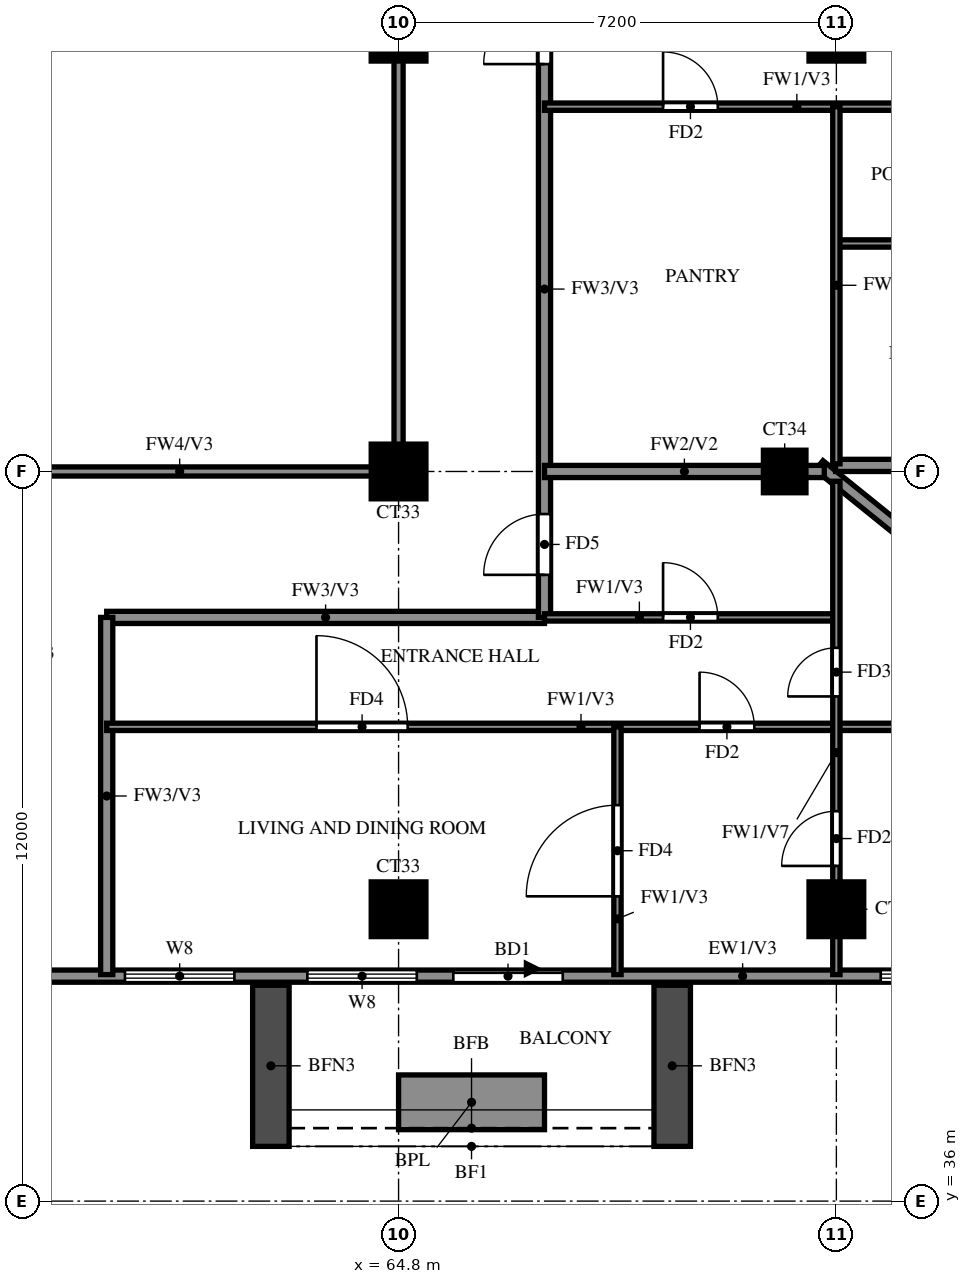
"""IFC4 building model, lengths in metres.
Left out: names, types, materials, properties, quantities, classifications, styles, units other than length and angle.
Written with IfcOpenShell. Run it as: python <this file> out.ifc"""

import sys

from ifc_helpers import new_model, si_unit, direction, frame, frame_2d, origin, origin_2d, place, context, subcontext, project, spatial, rectangle, extrude, source, transform, mapped, element, fill, save


model = new_model("IFC4")
c1 = context("Model", 3, precision=1e-05, world=origin(), true_north=direction((0.0, 1.0)))
c2 = subcontext(c1, "Body", "Model", "MODEL_VIEW")
j1 = project(units=[si_unit("LENGTHUNIT", "METRE"), si_unit("PLANEANGLEUNIT", "RADIAN")], contexts=[c1])
p1 = place(None, origin())
s1 = spatial("IfcSite", under=j1, at=p1, CompositionType="ELEMENT")
p2 = place(p1, origin())
s2 = spatial("IfcBuilding", under=s1, at=p2, CompositionType="ELEMENT")
p3 = place(p2, frame((0.0, 0.0, 229.0)))
s3 = spatial("IfcBuildingStorey", under=s2, at=p3, CompositionType="ELEMENT", Elevation=229.0)
m1 = source(origin(), c2, "Body", "SweptSolid", [
    extrude(rectangle(XDim=0.9, YDim=0.9, at=origin_2d()), origin(), (0.0, 0.0, 1.0), 3.22),
])
for number, where, z_axis, x_axis in (
    (1, (64.8, 40.8, 0.0), (0.0, 0.0, 1.0), (1.0, 0.0, 0.0)),
    (2, (72.0, 40.8, 0.0), (0.0, 0.0, 1.0), (1.0, 0.0, 0.0)),
    (3, (64.8, 48.0, 0.0), (0.0, 0.0, 1.0), (1.0, 0.0, 0.0)),
):
    element("IfcColumn", number, at=place(p3, frame(where, z_axis=z_axis, x_axis=x_axis)), inside=s3, PredefinedType="COLUMN", context=c2, shape_type="MappedRepresentation", body=[
        mapped(m1, transform((0.0, 0.0, 0.0))),
    ])
m2 = source(origin(), c2, "Body", "SweptSolid", [
    extrude(rectangle(XDim=0.7, YDim=0.7, at=origin_2d()), origin(), (0.0, 0.0, 1.0), 3.22),
])
p4 = place(p3, frame((71.15, 48.0, 0.0), z_axis=(0.0, 0.0, 1.0), x_axis=(1.0, 0.0, 0.0)))
e4 = element("IfcColumn", 4, at=p4, inside=s3, PredefinedType="COLUMN", context=c2, shape_type="MappedRepresentation", body=[
    mapped(m2, transform((0.0, 0.0, 0.0))),
])
for number, where, z_axis, x_axis in (
    (5, (64.8, 55.2, 0.0), (0.0, 0.0, 1.0), (1.0, 0.0, 0.0)),
    (6, (72.0, 55.2, 0.0), (0.0, 0.0, 1.0), (1.0, 0.0, 0.0)),
):
    element("IfcColumn", number, at=place(p3, frame(where, z_axis=z_axis, x_axis=x_axis)), inside=s3, PredefinedType="COLUMN", context=c2, shape_type="MappedRepresentation", body=[
        mapped(m1, transform((0.0, 0.0, 0.0))),
    ])
p5 = place(p3, frame((81.907, 39.87, 0.0), z_axis=(0.0, 0.0, 1.0), x_axis=(-0.777936274417, 0.62834318087, 0.0)))
e7 = element("IfcWall", 7, at=p5, inside=s3, PredefinedType="SOLIDWALL", context=c2, shape_type="SweptSolid", body=[
    extrude(rectangle(XDim=13.099, YDim=0.2, at=frame_2d((6.549, 0.0))), origin(), (0.0, 0.0, 1.0), 3.22),
])
p6 = place(p5, frame((9.938, 0.0, 1.5)))
e8 = element("IfcOpeningElement", 8, at=p6, cuts=e7, PredefinedType="OPENING", context=c2, shape_type="SweptSolid", body=[
    extrude(rectangle(XDim=0.9, YDim=0.9, at=frame_2d((0.45, 0.45))), frame((0.0, 0.11, 0.0), z_axis=(0.0, -1.0, 0.0), x_axis=(1.0, 0.0, 0.0)), (0.0, 0.0, 1.0), 0.22),
])
p7 = place(p3, frame((71.987, 48.1, 0.0), z_axis=(0.0, 0.0, 1.0), x_axis=(1.0, 0.0, 0.0)))
e9 = element("IfcWall", 9, at=p7, inside=s3, PredefinedType="SOLIDWALL", context=c2, shape_type="SweptSolid", body=[
    extrude(rectangle(XDim=6.763, YDim=0.2, at=frame_2d((3.381, 0.0))), origin(), (0.0, 0.0, 1.0), 3.22),
])
p8 = place(p7, frame((1.406, 0.0, 1.5)))
e10 = element("IfcOpeningElement", 10, at=p8, cuts=e9, PredefinedType="OPENING", context=c2, shape_type="SweptSolid", body=[
    extrude(rectangle(XDim=0.9, YDim=0.9, at=frame_2d((0.45, 0.45))), frame((0.0, 0.11, 0.0), z_axis=(0.0, -1.0, 0.0), x_axis=(1.0, 0.0, 0.0)), (0.0, 0.0, 1.0), 0.22),
])
p9 = place(p3, frame((58.8, 39.7, 0.0), z_axis=(0.0, 0.0, 1.0), x_axis=(1.0, 0.0, 0.0)))
e11 = element("IfcWall", 11, at=p9, inside=s3, PredefinedType="SOLIDWALL", context=c2, shape_type="SweptSolid", body=[
    extrude(rectangle(XDim=23.317, YDim=0.2, at=frame_2d((11.658, 0.0))), origin(), (0.0, 0.0, 1.0), 3.22),
])
p10 = place(p9, frame((6.9, 0.0, 0.0)))
e12 = element("IfcOpeningElement", 12, at=p10, cuts=e11, PredefinedType="OPENING", context=c2, shape_type="SweptSolid", body=[
    extrude(rectangle(XDim=1.8, YDim=2.4, at=frame_2d((0.9, 1.2))), frame((0.0, 0.11, 0.0), z_axis=(0.0, -1.0, 0.0), x_axis=(1.0, 0.0, 0.0)), (0.0, 0.0, 1.0), 0.22),
])
p11 = place(p9, frame((1.5, 0.0, 0.6)))
e13 = element("IfcOpeningElement", 13, at=p11, cuts=e11, PredefinedType="OPENING", context=c2, shape_type="SweptSolid", body=[
    extrude(rectangle(XDim=1.8, YDim=2.4, at=frame_2d((0.9, 1.2))), frame((0.0, 0.11, 0.0), z_axis=(0.0, -1.0, 0.0), x_axis=(1.0, 0.0, 0.0)), (0.0, 0.0, 1.0), 0.22),
])
p12 = place(p9, frame((4.5, 0.0, 0.6)))
e14 = element("IfcOpeningElement", 14, at=p12, cuts=e11, PredefinedType="OPENING", context=c2, shape_type="SweptSolid", body=[
    extrude(rectangle(XDim=1.8, YDim=2.4, at=frame_2d((0.9, 1.2))), frame((0.0, 0.11, 0.0), z_axis=(0.0, -1.0, 0.0), x_axis=(1.0, 0.0, 0.0)), (0.0, 0.0, 1.0), 0.22),
])
p13 = place(p9, frame((13.929, 0.0, 0.6)))
e15 = element("IfcOpeningElement", 15, at=p13, cuts=e11, PredefinedType="OPENING", context=c2, shape_type="SweptSolid", body=[
    extrude(rectangle(XDim=2.4, YDim=2.4, at=frame_2d((1.2, 1.2))), frame((0.0, 0.11, 0.0), z_axis=(0.0, -1.0, 0.0), x_axis=(1.0, 0.0, 0.0)), (0.0, 0.0, 1.0), 0.22),
])
p14 = place(p9, frame((16.958, 0.0, 0.6)))
e16 = element("IfcOpeningElement", 16, at=p14, cuts=e11, PredefinedType="OPENING", context=c2, shape_type="SweptSolid", body=[
    extrude(rectangle(XDim=2.4, YDim=2.4, at=frame_2d((1.2, 1.2))), frame((0.0, 0.11, 0.0), z_axis=(0.0, -1.0, 0.0), x_axis=(1.0, 0.0, 0.0)), (0.0, 0.0, 1.0), 0.22),
])
p15 = place(p9, frame((19.988, 0.0, 0.6)))
e17 = element("IfcOpeningElement", 17, at=p15, cuts=e11, PredefinedType="OPENING", context=c2, shape_type="SweptSolid", body=[
    extrude(rectangle(XDim=2.4, YDim=2.4, at=frame_2d((1.2, 1.2))), frame((0.0, 0.11, 0.0), z_axis=(0.0, -1.0, 0.0), x_axis=(1.0, 0.0, 0.0)), (0.0, 0.0, 1.0), 0.22),
])
for number, where, z_axis, x_axis in (
    (18, (62.7, 39.55, 0.0), (0.0, 0.0, 1.0), (0.0, -1.0, 0.0)),
    (19, (69.3, 39.55, 0.0), (0.0, 0.0, 1.0), (0.0, -1.0, 0.0)),
):
    element("IfcWall", number, at=place(p3, frame(where, z_axis=z_axis, x_axis=x_axis)), inside=s3, PredefinedType="SOLIDWALL", context=c2, shape_type="SweptSolid", body=[
        extrude(rectangle(XDim=2.65, YDim=0.6, at=frame_2d((1.325, 0.0))), origin(), (0.0, 0.0, 1.0), 2.85),
    ])
p16 = place(p3, frame((64.8, 37.625, 0.0), z_axis=(0.0, 0.0, 1.0), x_axis=(1.0, 0.0, 0.0)))
e20 = element("IfcWall", 20, at=p16, inside=s3, PredefinedType="SOLIDWALL", context=c2, shape_type="SweptSolid", body=[
    extrude(rectangle(XDim=2.4, YDim=0.9, at=frame_2d((1.2, 0.0))), origin(), (0.0, 0.0, 1.0), 0.9),
])
p17 = place(p3, frame((60.0, 45.6, 0.0), z_axis=(0.0, 0.0, 1.0), x_axis=(1.0, 0.0, 0.0)))
e21 = element("IfcWall", 21, at=p17, inside=s3, PredefinedType="SOLIDWALL", context=c2, shape_type="SweptSolid", body=[
    extrude(rectangle(XDim=7.2, YDim=0.2, at=frame_2d((3.6, 0.0))), origin(), (0.0, 0.0, 1.0), 3.22),
])
p18 = place(p3, frame((60.0, 39.725, 0.0), z_axis=(0.0, 0.0, 1.0), x_axis=(0.0, 1.0, 0.0)))
e22 = element("IfcWall", 22, at=p18, inside=s3, PredefinedType="SOLIDWALL", context=c2, shape_type="SweptSolid", body=[
    extrude(rectangle(XDim=5.875, YDim=0.2, at=frame_2d((2.938, 0.0))), origin(), (0.0, 0.0, 1.0), 3.22),
])
p19 = place(p3, frame((67.2, 45.6, 0.0), z_axis=(0.0, 0.0, 1.0), x_axis=(0.0, 1.0, 0.0)))
e23 = element("IfcWall", 23, at=p19, inside=s3, PredefinedType="SOLIDWALL", context=c2, shape_type="SweptSolid", body=[
    extrude(rectangle(XDim=10.8, YDim=0.2, at=frame_2d((5.4, 0.0))), origin(), (0.0, 0.0, 1.0), 3.22),
])
p20 = place(p19, frame((9.1, 0.0, 0.0)))
e24 = element("IfcOpeningElement", 24, at=p20, cuts=e23, PredefinedType="OPENING", context=c2, shape_type="SweptSolid", body=[
    extrude(rectangle(XDim=1.0, YDim=2.1, at=frame_2d((0.5, 1.05))), frame((0.0, 0.11, 0.0), z_axis=(0.0, -1.0, 0.0), x_axis=(1.0, 0.0, 0.0)), (0.0, 0.0, 1.0), 0.22),
])
p21 = place(p19, frame((0.7, 0.0, 0.0)))
e25 = element("IfcOpeningElement", 25, at=p21, cuts=e23, PredefinedType="OPENING", context=c2, shape_type="SweptSolid", body=[
    extrude(rectangle(XDim=1.0, YDim=2.1, at=frame_2d((0.5, 1.05))), frame((0.0, 0.11, 0.0), z_axis=(0.0, -1.0, 0.0), x_axis=(1.0, 0.0, 0.0)), (0.0, 0.0, 1.0), 0.22),
])
p22 = place(p3, frame((67.2, 48.0, 0.0), z_axis=(0.0, 0.0, 1.0), x_axis=(1.0, 0.0, 0.0)))
e26 = element("IfcWall", 26, at=p22, inside=s3, PredefinedType="SOLIDWALL", context=c2, shape_type="SweptSolid", body=[
    extrude(rectangle(XDim=4.601, YDim=0.2, at=frame_2d((2.301, 0.0))), origin(), (0.0, 0.0, 1.0), 3.22),
])
p23 = place(p3, frame((60.0, 43.8, 0.0), z_axis=(0.0, 0.0, 1.0), x_axis=(1.0, 0.0, 0.0)))
e27 = element("IfcWall", 27, at=p23, inside=s3, PredefinedType="PARTITIONING", context=c2, shape_type="SweptSolid", body=[
    extrude(rectangle(XDim=15.6, YDim=0.12, at=frame_2d((7.8, 0.0))), origin(), (0.0, 0.0, 1.0), 3.22),
])
p24 = place(p23, frame((9.75, 0.0, 0.0)))
e28 = element("IfcOpeningElement", 28, at=p24, cuts=e27, PredefinedType="OPENING", context=c2, shape_type="SweptSolid", body=[
    extrude(rectangle(XDim=0.9, YDim=2.1, at=frame_2d((0.45, 1.05))), frame((0.0, 0.07, 0.0), z_axis=(0.0, -1.0, 0.0), x_axis=(1.0, 0.0, 0.0)), (0.0, 0.0, 1.0), 0.14),
])
p25 = place(p23, frame((3.45, 0.0, 0.0)))
e29 = element("IfcOpeningElement", 29, at=p25, cuts=e27, PredefinedType="OPENING", context=c2, shape_type="SweptSolid", body=[
    extrude(rectangle(XDim=1.5, YDim=2.1, at=frame_2d((0.75, 1.05))), frame((0.0, 0.07, 0.0), z_axis=(0.0, -1.0, 0.0), x_axis=(1.0, 0.0, 0.0)), (0.0, 0.0, 1.0), 0.14),
])
p26 = place(p23, frame((13.4, 0.0, 0.0)))
e30 = element("IfcOpeningElement", 30, at=p26, cuts=e27, PredefinedType="OPENING", context=c2, shape_type="SweptSolid", body=[
    extrude(rectangle(XDim=0.8, YDim=2.1, at=frame_2d((0.4, 1.05))), frame((0.0, 0.07, 0.0), z_axis=(0.0, -1.0, 0.0), x_axis=(1.0, 0.0, 0.0)), (0.0, 0.0, 1.0), 0.14),
])
p27 = place(p3, frame((67.2, 45.6, 0.0), z_axis=(0.0, 0.0, 1.0), x_axis=(1.0, 0.0, 0.0)))
e31 = element("IfcWall", 31, at=p27, inside=s3, PredefinedType="PARTITIONING", context=c2, shape_type="SweptSolid", body=[
    extrude(rectangle(XDim=4.8, YDim=0.12, at=frame_2d((2.4, 0.0))), origin(), (0.0, 0.0, 1.0), 3.22),
])
p28 = place(p27, frame((1.95, 0.0, 0.0)))
e32 = element("IfcOpeningElement", 32, at=p28, cuts=e31, PredefinedType="OPENING", context=c2, shape_type="SweptSolid", body=[
    extrude(rectangle(XDim=0.9, YDim=2.1, at=frame_2d((0.45, 1.05))), frame((0.0, 0.07, 0.0), z_axis=(0.0, -1.0, 0.0), x_axis=(1.0, 0.0, 0.0)), (0.0, 0.0, 1.0), 0.14),
])
p29 = place(p3, frame((72.0, 51.75, 0.0), z_axis=(0.0, 0.0, 1.0), x_axis=(1.0, 0.0, 0.0)))
e33 = element("IfcWall", 33, at=p29, inside=s3, PredefinedType="PARTITIONING", context=c2, shape_type="SweptSolid", body=[
    extrude(rectangle(XDim=3.5, YDim=0.12, at=frame_2d((1.75, 0.0))), origin(), (0.0, 0.0, 1.0), 3.22),
])
p30 = place(p3, frame((67.2, 54.0, 0.0), z_axis=(0.0, 0.0, 1.0), x_axis=(1.0, 0.0, 0.0)))
e34 = element("IfcWall", 34, at=p30, inside=s3, PredefinedType="PARTITIONING", context=c2, shape_type="SweptSolid", body=[
    extrude(rectangle(XDim=8.3, YDim=0.12, at=frame_2d((4.15, 0.0))), origin(), (0.0, 0.0, 1.0), 3.22),
])
p31 = place(p30, frame((6.15, 0.0, 0.0)))
e35 = element("IfcOpeningElement", 35, at=p31, cuts=e34, PredefinedType="OPENING", context=c2, shape_type="SweptSolid", body=[
    extrude(rectangle(XDim=0.8, YDim=2.1, at=frame_2d((0.4, 1.05))), frame((0.0, 0.07, 0.0), z_axis=(0.0, -1.0, 0.0), x_axis=(1.0, 0.0, 0.0)), (0.0, 0.0, 1.0), 0.14),
])
p32 = place(p30, frame((1.95, 0.0, 0.0)))
e36 = element("IfcOpeningElement", 36, at=p32, cuts=e34, PredefinedType="OPENING", context=c2, shape_type="SweptSolid", body=[
    extrude(rectangle(XDim=0.9, YDim=2.1, at=frame_2d((0.45, 1.05))), frame((0.0, 0.07, 0.0), z_axis=(0.0, -1.0, 0.0), x_axis=(1.0, 0.0, 0.0)), (0.0, 0.0, 1.0), 0.14),
])
p33 = place(p3, frame((68.4, 39.725, 0.0), z_axis=(0.0, 0.0, 1.0), x_axis=(0.0, 1.0, 0.0)))
e37 = element("IfcWall", 37, at=p33, inside=s3, PredefinedType="PARTITIONING", context=c2, shape_type="SweptSolid", body=[
    extrude(rectangle(XDim=4.075, YDim=0.12, at=frame_2d((2.038, 0.0))), origin(), (0.0, 0.0, 1.0), 3.22),
])
p34 = place(p33, frame((1.288, 0.0, 0.0)))
e38 = element("IfcOpeningElement", 38, at=p34, cuts=e37, PredefinedType="OPENING", context=c2, shape_type="SweptSolid", body=[
    extrude(rectangle(XDim=1.5, YDim=2.1, at=frame_2d((0.75, 1.05))), frame((0.0, 0.07, 0.0), z_axis=(0.0, -1.0, 0.0), x_axis=(1.0, 0.0, 0.0)), (0.0, 0.0, 1.0), 0.14),
])
p35 = place(p3, frame((72.0, 39.725, 0.0), z_axis=(0.0, 0.0, 1.0), x_axis=(0.0, 1.0, 0.0)))
e39 = element("IfcWall", 39, at=p35, inside=s3, PredefinedType="PARTITIONING", context=c2, shape_type="SweptSolid", body=[
    extrude(rectangle(XDim=8.114, YDim=0.12, at=frame_2d((4.057, 0.0))), origin(), (0.0, 0.0, 1.0), 2.32),
])
p36 = place(p35, frame((1.788, 0.0, 0.0)))
e40 = element("IfcOpeningElement", 40, at=p36, cuts=e39, PredefinedType="OPENING", context=c2, shape_type="SweptSolid", body=[
    extrude(rectangle(XDim=0.9, YDim=2.1, at=frame_2d((0.45, 1.05))), frame((0.0, 0.07, 0.0), z_axis=(0.0, -1.0, 0.0), x_axis=(1.0, 0.0, 0.0)), (0.0, 0.0, 1.0), 0.14),
])
p37 = place(p35, frame((4.575, 0.0, 0.0)))
e41 = element("IfcOpeningElement", 41, at=p37, cuts=e39, PredefinedType="OPENING", context=c2, shape_type="SweptSolid", body=[
    extrude(rectangle(XDim=0.8, YDim=2.1, at=frame_2d((0.4, 1.05))), frame((0.0, 0.07, 0.0), z_axis=(0.0, -1.0, 0.0), x_axis=(1.0, 0.0, 0.0)), (0.0, 0.0, 1.0), 0.14),
])
p38 = place(p3, frame((72.0, 48.125, 0.0), z_axis=(0.0, 0.0, 1.0), x_axis=(0.0, 1.0, 0.0)))
e42 = element("IfcWall", 42, at=p38, inside=s3, PredefinedType="PARTITIONING", context=c2, shape_type="SweptSolid", body=[
    extrude(rectangle(XDim=5.875, YDim=0.12, at=frame_2d((2.938, 0.0))), origin(), (0.0, 0.0, 1.0), 3.22),
])
p39 = place(p3, frame((57.6, 48.0, 0.0), z_axis=(0.0, 0.0, 1.0), x_axis=(1.0, 0.0, 0.0)))
e43 = element("IfcWall", 43, at=p39, inside=s3, PredefinedType="SOLIDWALL", context=c2, shape_type="SweptSolid", body=[
    extrude(rectangle(XDim=7.2, YDim=0.15, at=frame_2d((3.6, 0.0))), origin(), (0.0, 0.0, 1.0), 2.32),
])
p40 = place(p3, frame((64.8, 48.0, 0.0), z_axis=(0.0, 0.0, 1.0), x_axis=(0.0, 1.0, 0.0)))
e44 = element("IfcWall", 44, at=p40, inside=s3, PredefinedType="SOLIDWALL", context=c2, shape_type="SweptSolid", body=[
    extrude(rectangle(XDim=14.4, YDim=0.15, at=frame_2d((7.2, 0.0))), origin(), (0.0, 0.0, 1.0), 2.32),
])
p41 = place(p10, origin())
e45 = element("IfcDoor", 45, at=p41, inside=s3, OperationType="DOUBLE_DOOR_SLIDING", PredefinedType="DOOR", context=c2, shape_type="SweptSolid", body=[
    extrude(rectangle(XDim=1.8, YDim=2.4, at=frame_2d((0.9, 1.2))), frame((0.0, 0.025, 0.0), z_axis=(0.0, -1.0, 0.0), x_axis=(1.0, 0.0, 0.0)), (0.0, 0.0, 1.0), 0.05),
])
fill(e12, e45)
p42 = place(p11, origin())
e46 = element("IfcWindow", 46, at=p42, inside=s3, PartitioningType="DOUBLE_PANEL_VERTICAL", PredefinedType="WINDOW", context=c2, shape_type="SweptSolid", body=[
    extrude(rectangle(XDim=1.8, YDim=2.4, at=frame_2d((0.9, 1.2))), frame((0.0, 0.03, 0.0), z_axis=(0.0, -1.0, 0.0), x_axis=(1.0, 0.0, 0.0)), (0.0, 0.0, 1.0), 0.06),
])
fill(e13, e46)
p43 = place(p12, origin())
e47 = element("IfcWindow", 47, at=p43, inside=s3, PartitioningType="DOUBLE_PANEL_VERTICAL", PredefinedType="WINDOW", context=c2, shape_type="SweptSolid", body=[
    extrude(rectangle(XDim=1.8, YDim=2.4, at=frame_2d((0.9, 1.2))), frame((0.0, 0.03, 0.0), z_axis=(0.0, -1.0, 0.0), x_axis=(1.0, 0.0, 0.0)), (0.0, 0.0, 1.0), 0.06),
])
fill(e14, e47)
p44 = place(p13, origin())
e48 = element("IfcWindow", 48, at=p44, inside=s3, PartitioningType="DOUBLE_PANEL_VERTICAL", PredefinedType="WINDOW", context=c2, shape_type="SweptSolid", body=[
    extrude(rectangle(XDim=2.4, YDim=2.4, at=frame_2d((1.2, 1.2))), frame((0.0, 0.03, 0.0), z_axis=(0.0, -1.0, 0.0), x_axis=(1.0, 0.0, 0.0)), (0.0, 0.0, 1.0), 0.06),
])
fill(e15, e48)
p45 = place(p20, origin())
e49 = element("IfcDoor", 49, at=p45, inside=s3, OperationType="SINGLE_SWING_LEFT", PredefinedType="DOOR", context=c2, shape_type="SweptSolid", body=[
    extrude(rectangle(XDim=1.0, YDim=2.1, at=frame_2d((0.5, 1.05))), frame((0.0, 0.025, 0.0), z_axis=(0.0, -1.0, 0.0), x_axis=(1.0, 0.0, 0.0)), (0.0, 0.0, 1.0), 0.05),
])
fill(e24, e49)
p46 = place(p32, origin())
e50 = element("IfcDoor", 50, at=p46, inside=s3, OperationType="SINGLE_SWING_LEFT", PredefinedType="DOOR", context=c2, shape_type="SweptSolid", body=[
    extrude(rectangle(XDim=0.9, YDim=2.1, at=frame_2d((0.45, 1.05))), frame((0.0, 0.025, 0.0), z_axis=(0.0, -1.0, 0.0), x_axis=(1.0, 0.0, 0.0)), (0.0, 0.0, 1.0), 0.05),
])
fill(e36, e50)
p47 = place(p34, origin())
e51 = element("IfcDoor", 51, at=p47, inside=s3, OperationType="SINGLE_SWING_LEFT", PredefinedType="DOOR", context=c2, shape_type="SweptSolid", body=[
    extrude(rectangle(XDim=1.5, YDim=2.1, at=frame_2d((0.75, 1.05))), frame((0.0, 0.025, 0.0), z_axis=(0.0, -1.0, 0.0), x_axis=(1.0, 0.0, 0.0)), (0.0, 0.0, 1.0), 0.05),
])
fill(e38, e51)
p48 = place(p28, origin())
e52 = element("IfcDoor", 52, at=p48, inside=s3, OperationType="SINGLE_SWING_LEFT", PredefinedType="DOOR", context=c2, shape_type="SweptSolid", body=[
    extrude(rectangle(XDim=0.9, YDim=2.1, at=frame_2d((0.45, 1.05))), frame((0.0, 0.025, 0.0), z_axis=(0.0, -1.0, 0.0), x_axis=(1.0, 0.0, 0.0)), (0.0, 0.0, 1.0), 0.05),
])
fill(e32, e52)
p49 = place(p21, origin())
e53 = element("IfcDoor", 53, at=p49, inside=s3, OperationType="SINGLE_SWING_RIGHT", PredefinedType="DOOR", context=c2, shape_type="SweptSolid", body=[
    extrude(rectangle(XDim=1.0, YDim=2.1, at=frame_2d((0.5, 1.05))), frame((0.0, 0.025, 0.0), z_axis=(0.0, -1.0, 0.0), x_axis=(1.0, 0.0, 0.0)), (0.0, 0.0, 1.0), 0.05),
])
fill(e25, e53)
p50 = place(p24, origin())
e54 = element("IfcDoor", 54, at=p50, inside=s3, OperationType="SINGLE_SWING_LEFT", PredefinedType="DOOR", context=c2, shape_type="SweptSolid", body=[
    extrude(rectangle(XDim=0.9, YDim=2.1, at=frame_2d((0.45, 1.05))), frame((0.0, 0.025, 0.0), z_axis=(0.0, -1.0, 0.0), x_axis=(1.0, 0.0, 0.0)), (0.0, 0.0, 1.0), 0.05),
])
fill(e28, e54)
p51 = place(p25, origin())
e55 = element("IfcDoor", 55, at=p51, inside=s3, OperationType="SINGLE_SWING_LEFT", PredefinedType="DOOR", context=c2, shape_type="SweptSolid", body=[
    extrude(rectangle(XDim=1.5, YDim=2.1, at=frame_2d((0.75, 1.05))), frame((0.0, 0.025, 0.0), z_axis=(0.0, -1.0, 0.0), x_axis=(1.0, 0.0, 0.0)), (0.0, 0.0, 1.0), 0.05),
])
fill(e29, e55)
p52 = place(p36, origin())
e56 = element("IfcDoor", 56, at=p52, inside=s3, OperationType="SINGLE_SWING_LEFT", PredefinedType="DOOR", context=c2, shape_type="SweptSolid", body=[
    extrude(rectangle(XDim=0.9, YDim=2.1, at=frame_2d((0.45, 1.05))), frame((0.0, 0.025, 0.0), z_axis=(0.0, -1.0, 0.0), x_axis=(1.0, 0.0, 0.0)), (0.0, 0.0, 1.0), 0.05),
])
fill(e40, e56)
p53 = place(p37, origin())
e57 = element("IfcDoor", 57, at=p53, inside=s3, OperationType="SINGLE_SWING_LEFT", PredefinedType="DOOR", context=c2, shape_type="SweptSolid", body=[
    extrude(rectangle(XDim=0.8, YDim=2.1, at=frame_2d((0.4, 1.05))), frame((0.0, 0.025, 0.0), z_axis=(0.0, -1.0, 0.0), x_axis=(1.0, 0.0, 0.0)), (0.0, 0.0, 1.0), 0.05),
])
fill(e41, e57)
save(model, sys.argv[1])
